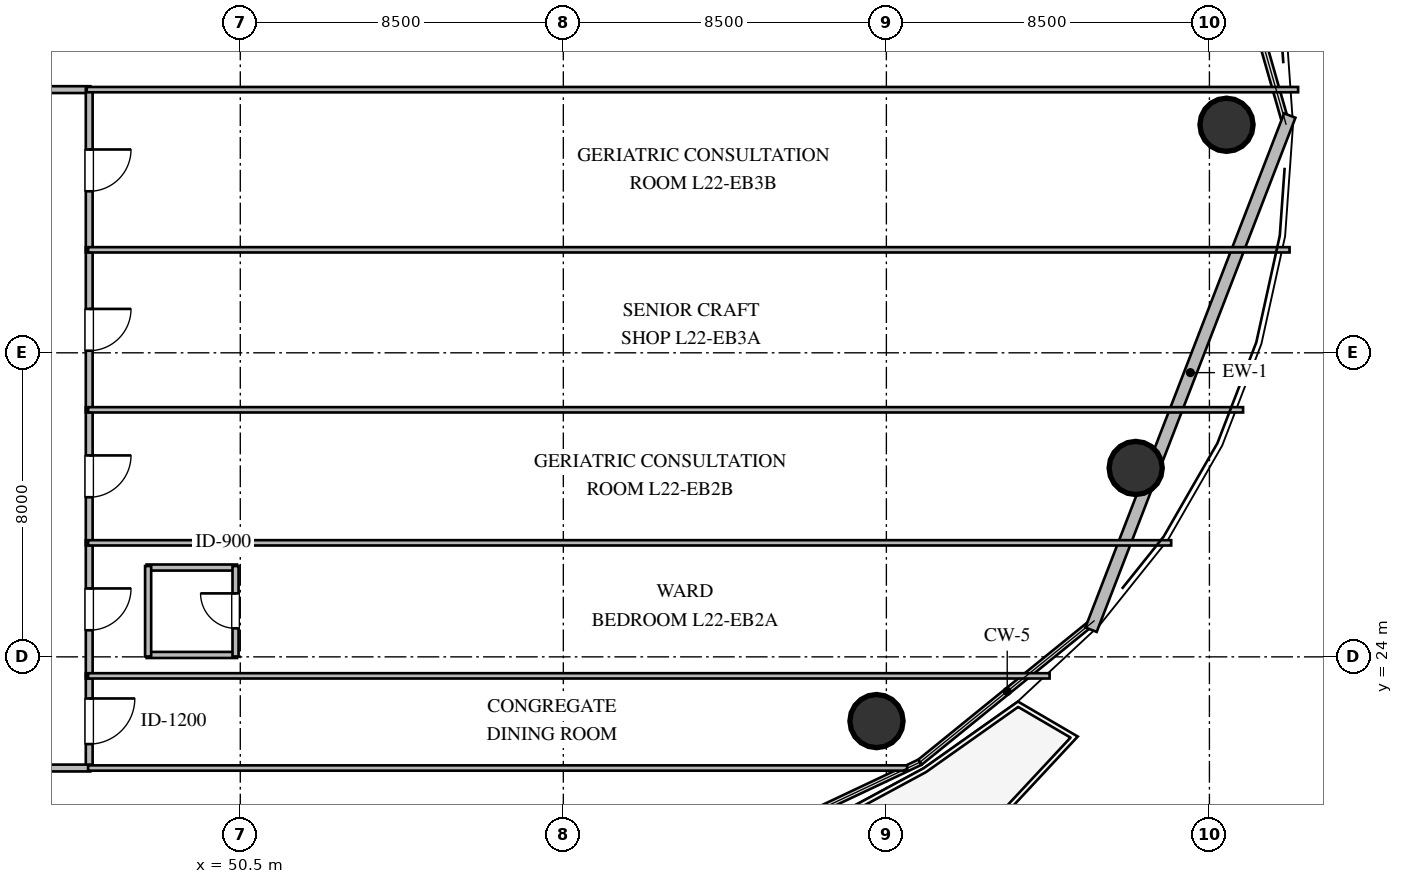
"""IFC4 building model, lengths in metres.
Left out: names, types, materials, properties, quantities, classifications, styles, units other than length and angle.
Written with IfcOpenShell. Run it as: python <this file> out.ifc"""

import sys

from ifc_helpers import new_model, si_unit, direction, frame, frame_2d, origin, origin_2d, place, context, subcontext, project, spatial, rectangle, circle, extrude, element, fill, save


model = new_model("IFC4")
c1 = context("Model", 3, precision=1e-05, world=origin(), true_north=direction((0.0, 1.0)))
c2 = subcontext(c1, "Body", "Model", "MODEL_VIEW")
j1 = project(units=[si_unit("LENGTHUNIT", "METRE"), si_unit("PLANEANGLEUNIT", "RADIAN")], contexts=[c1])
p1 = place(None, origin())
s1 = spatial("IfcSite", under=j1, at=p1, CompositionType="ELEMENT")
p2 = place(p1, origin())
s2 = spatial("IfcBuilding", under=s1, at=p2, CompositionType="ELEMENT")
p3 = place(p2, frame((0.0, 0.0, 85.2)))
s3 = spatial("IfcBuildingStorey", under=s2, at=p3, CompositionType="ELEMENT", Elevation=85.2)
for number, where, z_axis, x_axis in (
    (1, (76.45, 38.0, 0.0), (0.0, 0.0, 1.0), (1.0, 0.0, 0.0)),
    (2, (67.24, 22.31, 0.0), (0.0, 0.0, 1.0), (1.0, 0.0, 0.0)),
    (3, (74.06, 28.97, 0.0), (0.0, 0.0, 1.0), (1.0, 0.0, 0.0)),
):
    element("IfcColumn", number, at=place(p3, frame(where, z_axis=z_axis, x_axis=x_axis)), inside=s3, PredefinedType="COLUMN", context=c2, shape_type="SweptSolid", body=[
        extrude(circle(Radius=0.7, at=origin_2d()), origin(), (0.0, 0.0, 1.0), 3.6),
    ])
p4 = place(p3, frame((78.114, 38.243, 0.0), z_axis=(0.0, 0.0, 1.0), x_axis=(-0.360517110943, -0.932752599952, 0.0)))
e4 = element("IfcWall", 4, at=p4, inside=s3, PredefinedType="STANDARD", context=c2, shape_type="SweptSolid", body=[
    extrude(rectangle(XDim=14.504, YDim=0.32, at=frame_2d((7.252, 0.0))), origin(), (0.0, 0.0, 1.0), 2.738),
])
p5 = place(p3, frame((48.035, 24.05, 0.0), z_axis=(0.0, 0.0, 1.0), x_axis=(1.0, 0.0, 0.0)))
e5 = element("IfcWall", 5, at=p5, inside=s3, PredefinedType="PLUMBINGWALL", context=c2, shape_type="SweptSolid", body=[
    extrude(rectangle(XDim=2.38, YDim=0.16, at=frame_2d((1.19, 0.0))), origin(), (0.0, 0.0, 1.0), 2.806),
])
p6 = place(p3, frame((48.035, 26.35, 0.0), z_axis=(0.0, 0.0, 1.0), x_axis=(1.0, 0.0, 0.0)))
e6 = element("IfcWall", 6, at=p6, inside=s3, PredefinedType="PLUMBINGWALL", context=c2, shape_type="SweptSolid", body=[
    extrude(rectangle(XDim=2.38, YDim=0.16, at=frame_2d((1.19, 0.0))), origin(), (0.0, 0.0, 1.0), 3.36),
])
p7 = place(p3, frame((48.075, 24.01, 0.0), z_axis=(0.0, 0.0, 1.0), x_axis=(0.0, 1.0, 0.0)))
e7 = element("IfcWall", 7, at=p7, inside=s3, PredefinedType="PLUMBINGWALL", context=c2, shape_type="SweptSolid", body=[
    extrude(rectangle(XDim=2.38, YDim=0.16, at=frame_2d((1.19, 0.0))), origin(), (0.0, 0.0, 1.0), 3.36),
])
p8 = place(p3, frame((50.375, 24.01, 0.0), z_axis=(0.0, 0.0, 1.0), x_axis=(0.0, 1.0, 0.0)))
e8 = element("IfcWall", 8, at=p8, inside=s3, PredefinedType="PLUMBINGWALL", context=c2, shape_type="SweptSolid", body=[
    extrude(rectangle(XDim=2.38, YDim=0.16, at=frame_2d((1.19, 0.0))), origin(), (0.0, 0.0, 1.0), 3.36),
])
p9 = place(p8, frame((0.74, 0.0, 0.0)))
e9 = element("IfcOpeningElement", 9, at=p9, cuts=e8, PredefinedType="OPENING", context=c2, shape_type="SweptSolid", body=[
    extrude(rectangle(XDim=0.92, YDim=2.1, at=frame_2d((0.46, 1.05))), frame((0.0, 0.09, 0.0), z_axis=(0.0, -1.0, 0.0), x_axis=(1.0, 0.0, 0.0)), (0.0, 0.0, 1.0), 0.18),
])
p10 = place(p3, frame((41.935, 38.925, 0.0), z_axis=(0.0, 0.0, 1.0), x_axis=(1.0, 0.0, 0.0)))
e10 = element("IfcWall", 10, at=p10, inside=s3, PredefinedType="PARTITIONING", context=c2, shape_type="SweptSolid", body=[
    extrude(rectangle(XDim=4.62, YDim=0.18, at=frame_2d((2.31, 0.0))), origin(), (0.0, 0.0, 1.0), 3.36),
])
p11 = place(p10, frame((1.76, 0.0, 0.0)))
e11 = element("IfcOpeningElement", 11, at=p11, cuts=e10, PredefinedType="OPENING", context=c2, shape_type="SweptSolid", body=[
    extrude(rectangle(XDim=1.1, YDim=2.1, at=frame_2d((0.55, 1.05))), frame((0.0, 0.1, 0.0), z_axis=(0.0, -1.0, 0.0), x_axis=(1.0, 0.0, 0.0)), (0.0, 0.0, 1.0), 0.2),
])
p12 = place(p3, frame((46.525, 23.565, 0.0), z_axis=(0.0, 0.0, 1.0), x_axis=(0.0, -1.0, 0.0)))
e12 = element("IfcWall", 12, at=p12, inside=s3, PredefinedType="PARTITIONING", context=c2, shape_type="SweptSolid", body=[
    extrude(rectangle(XDim=2.52, YDim=0.18, at=frame_2d((1.26, 0.0))), origin(), (0.0, 0.0, 1.0), 3.36),
])
p13 = place(p12, frame((0.66, 0.0, 0.0)))
e13 = element("IfcOpeningElement", 13, at=p13, cuts=e12, PredefinedType="OPENING", context=c2, shape_type="SweptSolid", body=[
    extrude(rectangle(XDim=1.2, YDim=2.15, at=frame_2d((0.6, 1.075))), frame((0.0, 0.1, 0.0), z_axis=(0.0, -1.0, 0.0), x_axis=(1.0, 0.0, 0.0)), (0.0, 0.0, 1.0), 0.2),
])
p14 = place(p3, frame((46.525, 27.065, 0.0), z_axis=(0.0, 0.0, 1.0), x_axis=(0.0, -1.0, 0.0)))
e14 = element("IfcWall", 14, at=p14, inside=s3, PredefinedType="PARTITIONING", context=c2, shape_type="SweptSolid", body=[
    extrude(rectangle(XDim=3.63, YDim=0.18, at=frame_2d((1.815, 0.0))), origin(), (0.0, 0.0, 1.0), 3.36),
])
p15 = place(p14, frame((1.265, 0.0, 0.0)))
e15 = element("IfcOpeningElement", 15, at=p15, cuts=e14, PredefinedType="OPENING", context=c2, shape_type="SweptSolid", body=[
    extrude(rectangle(XDim=1.1, YDim=2.1, at=frame_2d((0.55, 1.05))), frame((0.0, 0.1, 0.0), z_axis=(0.0, -1.0, 0.0), x_axis=(1.0, 0.0, 0.0)), (0.0, 0.0, 1.0), 0.2),
])
p16 = place(p3, frame((46.525, 30.565, 0.0), z_axis=(0.0, 0.0, 1.0), x_axis=(0.0, -1.0, 0.0)))
e16 = element("IfcWall", 16, at=p16, inside=s3, PredefinedType="PARTITIONING", context=c2, shape_type="SweptSolid", body=[
    extrude(rectangle(XDim=3.63, YDim=0.18, at=frame_2d((1.815, 0.0))), origin(), (0.0, 0.0, 1.0), 3.36),
])
p17 = place(p16, frame((1.265, 0.0, 0.0)))
e17 = element("IfcOpeningElement", 17, at=p17, cuts=e16, PredefinedType="OPENING", context=c2, shape_type="SweptSolid", body=[
    extrude(rectangle(XDim=1.1, YDim=2.1, at=frame_2d((0.55, 1.05))), frame((0.0, 0.1, 0.0), z_axis=(0.0, -1.0, 0.0), x_axis=(1.0, 0.0, 0.0)), (0.0, 0.0, 1.0), 0.2),
])
p18 = place(p3, frame((46.525, 34.775, 0.0), z_axis=(0.0, 0.0, 1.0), x_axis=(0.0, -1.0, 0.0)))
e18 = element("IfcWall", 18, at=p18, inside=s3, PredefinedType="PARTITIONING", context=c2, shape_type="SweptSolid", body=[
    extrude(rectangle(XDim=4.34, YDim=0.18, at=frame_2d((2.17, 0.0))), origin(), (0.0, 0.0, 1.0), 3.36),
])
p19 = place(p18, frame((1.62, 0.0, 0.0)))
e19 = element("IfcOpeningElement", 19, at=p19, cuts=e18, PredefinedType="OPENING", context=c2, shape_type="SweptSolid", body=[
    extrude(rectangle(XDim=1.1, YDim=2.1, at=frame_2d((0.55, 1.05))), frame((0.0, 0.1, 0.0), z_axis=(0.0, -1.0, 0.0), x_axis=(1.0, 0.0, 0.0)), (0.0, 0.0, 1.0), 0.2),
])
p20 = place(p3, frame((46.525, 38.955, 0.0), z_axis=(0.0, 0.0, 1.0), x_axis=(0.0, -1.0, 0.0)))
e20 = element("IfcWall", 20, at=p20, inside=s3, PredefinedType="PARTITIONING", context=c2, shape_type="SweptSolid", body=[
    extrude(rectangle(XDim=4.31, YDim=0.18, at=frame_2d((2.155, 0.0))), origin(), (0.0, 0.0, 1.0), 3.36),
])
p21 = place(p20, frame((1.605, 0.0, 0.0)))
e21 = element("IfcOpeningElement", 21, at=p21, cuts=e20, PredefinedType="OPENING", context=c2, shape_type="SweptSolid", body=[
    extrude(rectangle(XDim=1.1, YDim=2.1, at=frame_2d((0.55, 1.05))), frame((0.0, 0.1, 0.0), z_axis=(0.0, -1.0, 0.0), x_axis=(1.0, 0.0, 0.0)), (0.0, 0.0, 1.0), 0.2),
])
p22 = place(p3, frame((46.555, 21.075, 0.0), z_axis=(0.0, 0.0, 1.0), x_axis=(-1.0, 0.0, 0.0)))
e22 = element("IfcWall", 22, at=p22, inside=s3, PredefinedType="PARTITIONING", context=c2, shape_type="SweptSolid", body=[
    extrude(rectangle(XDim=11.12, YDim=0.18, at=frame_2d((5.56, 0.0))), origin(), (0.0, 0.0, 1.0), 2.996),
])
p23 = place(p22, frame((4.96, 0.0, 0.0)))
e23 = element("IfcOpeningElement", 23, at=p23, cuts=e22, PredefinedType="OPENING", context=c2, shape_type="SweptSolid", body=[
    extrude(rectangle(XDim=1.2, YDim=2.15, at=frame_2d((0.6, 1.075))), frame((0.0, 0.1, 0.0), z_axis=(0.0, -1.0, 0.0), x_axis=(1.0, 0.0, 0.0)), (0.0, 0.0, 1.0), 0.2),
])
p24 = place(p3, frame((78.334, 38.925, 0.0), z_axis=(0.0, 0.0, 1.0), x_axis=(-1.0, 0.0, 0.0)))
e24 = element("IfcWall", 24, at=p24, inside=s3, PredefinedType="PARTITIONING", context=c2, shape_type="SweptSolid", body=[
    extrude(rectangle(XDim=31.874, YDim=0.14, at=frame_2d((15.937, 0.0))), origin(), (0.0, 0.0, 1.0), 3.36),
])
p25 = place(p3, frame((46.495, 23.5, 0.0), z_axis=(0.0, 0.0, 1.0), x_axis=(1.0, 0.0, 0.0)))
e25 = element("IfcWall", 25, at=p25, inside=s3, PredefinedType="PARTITIONING", context=c2, shape_type="SweptSolid", body=[
    extrude(rectangle(XDim=25.3, YDim=0.14, at=frame_2d((12.65, 0.0))), origin(), (0.0, 0.0, 1.0), 2.806),
])
p26 = place(p3, frame((68.049, 21.075, 0.0), z_axis=(0.0, 0.0, 1.0), x_axis=(-1.0, 0.0, 0.0)))
e26 = element("IfcWall", 26, at=p26, inside=s3, PredefinedType="PARTITIONING", context=c2, shape_type="SweptSolid", body=[
    extrude(rectangle(XDim=21.554, YDim=0.14, at=frame_2d((10.777, 0.0))), origin(), (0.0, 0.0, 1.0), 2.996),
])
p27 = place(p3, frame((46.495, 27.0, 0.0), z_axis=(0.0, 0.0, 1.0), x_axis=(1.0, 0.0, 0.0)))
e27 = element("IfcWall", 27, at=p27, inside=s3, PredefinedType="PARTITIONING", context=c2, shape_type="SweptSolid", body=[
    extrude(rectangle(XDim=28.499, YDim=0.14, at=frame_2d((14.25, 0.0))), origin(), (0.0, 0.0, 1.0), 2.806),
])
p28 = place(p3, frame((46.495, 30.5, 0.0), z_axis=(0.0, 0.0, 1.0), x_axis=(1.0, 0.0, 0.0)))
e28 = element("IfcWall", 28, at=p28, inside=s3, PredefinedType="PARTITIONING", context=c2, shape_type="SweptSolid", body=[
    extrude(rectangle(XDim=30.391, YDim=0.14, at=frame_2d((15.195, 0.0))), origin(), (0.0, 0.0, 1.0), 3.36),
])
p29 = place(p3, frame((46.495, 34.71, 0.0), z_axis=(0.0, 0.0, 1.0), x_axis=(1.0, 0.0, 0.0)))
e29 = element("IfcWall", 29, at=p29, inside=s3, PredefinedType="PARTITIONING", context=c2, shape_type="SweptSolid", body=[
    extrude(rectangle(XDim=31.614, YDim=0.14, at=frame_2d((15.807, 0.0))), origin(), (0.0, 0.0, 1.0), 3.36),
])
p30 = place(p9, origin())
e30 = element("IfcDoor", 30, at=p30, inside=s3, OperationType="SINGLE_SWING_RIGHT", PredefinedType="DOOR", context=c2, shape_type="SweptSolid", body=[
    extrude(rectangle(XDim=0.92, YDim=2.1, at=frame_2d((0.46, 1.05))), frame((0.0, 0.025, 0.0), z_axis=(0.0, -1.0, 0.0), x_axis=(1.0, 0.0, 0.0)), (0.0, 0.0, 1.0), 0.05),
])
fill(e9, e30)
p31 = place(p13, origin())
e31 = element("IfcDoor", 31, at=p31, inside=s3, OperationType="SINGLE_SWING_LEFT", PredefinedType="DOOR", context=c2, shape_type="SweptSolid", body=[
    extrude(rectangle(XDim=1.2, YDim=2.15, at=frame_2d((0.6, 1.075))), frame((0.0, 0.025, 0.0), z_axis=(0.0, -1.0, 0.0), x_axis=(1.0, 0.0, 0.0)), (0.0, 0.0, 1.0), 0.05),
])
fill(e13, e31)
p32 = place(p15, origin())
e32 = element("IfcDoor", 32, at=p32, inside=s3, OperationType="SINGLE_SWING_LEFT", PredefinedType="DOOR", context=c2, shape_type="SweptSolid", body=[
    extrude(rectangle(XDim=1.1, YDim=2.1, at=frame_2d((0.55, 1.05))), frame((0.0, 0.025, 0.0), z_axis=(0.0, -1.0, 0.0), x_axis=(1.0, 0.0, 0.0)), (0.0, 0.0, 1.0), 0.05),
])
fill(e15, e32)
p33 = place(p17, origin())
e33 = element("IfcDoor", 33, at=p33, inside=s3, OperationType="SINGLE_SWING_LEFT", PredefinedType="DOOR", context=c2, shape_type="SweptSolid", body=[
    extrude(rectangle(XDim=1.1, YDim=2.1, at=frame_2d((0.55, 1.05))), frame((0.0, 0.025, 0.0), z_axis=(0.0, -1.0, 0.0), x_axis=(1.0, 0.0, 0.0)), (0.0, 0.0, 1.0), 0.05),
])
fill(e17, e33)
p34 = place(p19, origin())
e34 = element("IfcDoor", 34, at=p34, inside=s3, OperationType="SINGLE_SWING_LEFT", PredefinedType="DOOR", context=c2, shape_type="SweptSolid", body=[
    extrude(rectangle(XDim=1.1, YDim=2.1, at=frame_2d((0.55, 1.05))), frame((0.0, 0.025, 0.0), z_axis=(0.0, -1.0, 0.0), x_axis=(1.0, 0.0, 0.0)), (0.0, 0.0, 1.0), 0.05),
])
fill(e19, e34)
p35 = place(p21, origin())
e35 = element("IfcDoor", 35, at=p35, inside=s3, OperationType="SINGLE_SWING_LEFT", PredefinedType="DOOR", context=c2, shape_type="SweptSolid", body=[
    extrude(rectangle(XDim=1.1, YDim=2.1, at=frame_2d((0.55, 1.05))), frame((0.0, 0.025, 0.0), z_axis=(0.0, -1.0, 0.0), x_axis=(1.0, 0.0, 0.0)), (0.0, 0.0, 1.0), 0.05),
])
fill(e21, e35)
save(model, sys.argv[1])
